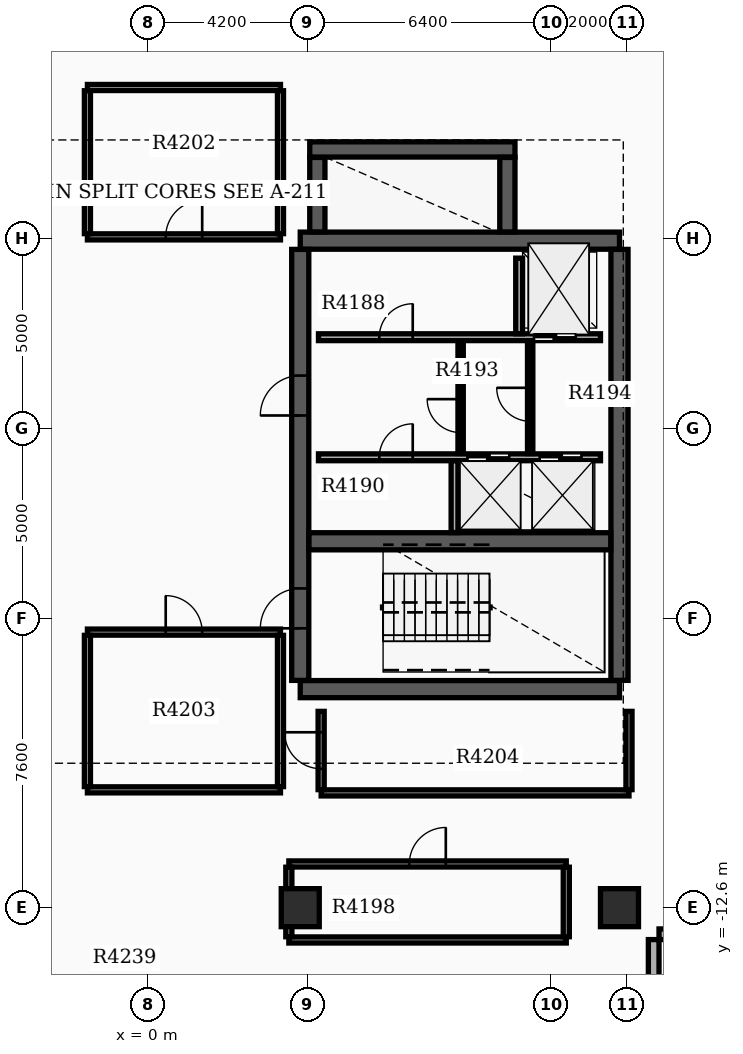
"""IFC4 building model, lengths in metres.
Left out: names, types, materials, properties, quantities, classifications, styles, units other than length and angle.
Written with IfcOpenShell. Run it as: python <this file> out.ifc"""

import sys

from ifc_helpers import new_model, si_unit, direction, frame, frame_2d, origin, origin_2d, place, context, subcontext, project, spatial, rectangle, extrude, element, fill, save


model = new_model("IFC4")
c1 = context("Model", 3, precision=1e-05, world=origin(), true_north=direction((0.0, 1.0)))
c2 = subcontext(c1, "Body", "Model", "MODEL_VIEW")
j1 = project(units=[si_unit("LENGTHUNIT", "METRE"), si_unit("PLANEANGLEUNIT", "RADIAN")], contexts=[c1])
p1 = place(None, origin())
s1 = spatial("IfcSite", under=j1, at=p1, CompositionType="ELEMENT")
p2 = place(p1, origin())
s2 = spatial("IfcBuilding", under=s1, at=p2, CompositionType="ELEMENT")
p3 = place(p2, frame((0.0, 0.0, 265.5)))
s3 = spatial("IfcBuildingStorey", under=s2, at=p3, CompositionType="ELEMENT", Elevation=265.5)
for number, where, z_axis, x_axis in (
    (1, (4.0, -6.85, 0.0), (0.0, 0.0, 1.0), (1.0, 0.0, 0.0)),
    (2, (4.0, 4.95, 0.0), (0.0, 0.0, 1.0), (1.0, 0.0, 0.0)),
):
    element("IfcWall", number, at=place(p3, frame(where, z_axis=z_axis, x_axis=x_axis)), inside=s3, PredefinedType="SHEAR", context=c2, shape_type="SweptSolid", body=[
        extrude(rectangle(XDim=8.4, YDim=0.45, at=frame_2d((4.2, 0.0))), origin(), (0.0, 0.0, 1.0), 3.7),
    ])
p4 = place(p3, frame((4.0, -6.62, 0.0), z_axis=(0.0, 0.0, 1.0), x_axis=(0.0, 1.0, 0.0)))
e3 = element("IfcWall", 3, at=p4, inside=s3, PredefinedType="SHEAR", context=c2, shape_type="SweptSolid", body=[
    extrude(rectangle(XDim=11.34, YDim=0.45, at=frame_2d((5.67, 0.0))), origin(), (0.0, 0.0, 1.0), 3.7),
])
p5 = place(p4, frame((1.37, 0.0, 0.0)))
e4 = element("IfcOpeningElement", 4, at=p5, cuts=e3, PredefinedType="OPENING", context=c2, shape_type="SweptSolid", body=[
    extrude(rectangle(XDim=1.05, YDim=2.15, at=frame_2d((0.525, 1.075))), frame((0.0, 0.235, 0.0), z_axis=(0.0, -1.0, 0.0), x_axis=(1.0, 0.0, 0.0)), (0.0, 0.0, 1.0), 0.47),
])
p6 = place(p4, frame((6.97, 0.0, 0.0)))
e5 = element("IfcOpeningElement", 5, at=p6, cuts=e3, PredefinedType="OPENING", context=c2, shape_type="SweptSolid", body=[
    extrude(rectangle(XDim=1.05, YDim=2.15, at=frame_2d((0.525, 1.075))), frame((0.0, 0.235, 0.0), z_axis=(0.0, -1.0, 0.0), x_axis=(1.0, 0.0, 0.0)), (0.0, 0.0, 1.0), 0.47),
])
p7 = place(p3, frame((12.4, -6.62, 0.0), z_axis=(0.0, 0.0, 1.0), x_axis=(0.0, 1.0, 0.0)))
e6 = element("IfcWall", 6, at=p7, inside=s3, PredefinedType="SHEAR", context=c2, shape_type="SweptSolid", body=[
    extrude(rectangle(XDim=11.34, YDim=0.45, at=frame_2d((5.67, 0.0))), origin(), (0.0, 0.0, 1.0), 3.7),
])
p8 = place(p3, frame((4.23, -2.96, 0.0), z_axis=(0.0, 0.0, 1.0), x_axis=(1.0, 0.0, 0.0)))
e7 = element("IfcWall", 7, at=p8, inside=s3, PredefinedType="SHEAR", context=c2, shape_type="SweptSolid", body=[
    extrude(rectangle(XDim=7.94, YDim=0.45, at=frame_2d((3.97, 0.0))), origin(), (0.0, 0.0, 1.0), 3.7),
])
p9 = place(p3, frame((4.45, 5.18, 0.0), z_axis=(0.0, 0.0, 1.0), x_axis=(0.0, 1.0, 0.0)))
e8 = element("IfcWall", 8, at=p9, inside=s3, PredefinedType="SHEAR", context=c2, shape_type="SweptSolid", body=[
    extrude(rectangle(XDim=1.96, YDim=0.4, at=frame_2d((0.98, 0.0))), origin(), (0.0, 0.0, 1.0), 3.7),
])
p10 = place(p3, frame((4.25, 7.35, 0.0), z_axis=(0.0, 0.0, 1.0), x_axis=(1.0, 0.0, 0.0)))
e9 = element("IfcWall", 9, at=p10, inside=s3, PredefinedType="SHEAR", context=c2, shape_type="SweptSolid", body=[
    extrude(rectangle(XDim=5.4, YDim=0.4, at=frame_2d((2.7, 0.0))), origin(), (0.0, 0.0, 1.0), 3.7),
])
p11 = place(p3, frame((9.45, 5.18, 0.0), z_axis=(0.0, 0.0, 1.0), x_axis=(0.0, 1.0, 0.0)))
e10 = element("IfcWall", 10, at=p11, inside=s3, PredefinedType="SHEAR", context=c2, shape_type="SweptSolid", body=[
    extrude(rectangle(XDim=1.96, YDim=0.4, at=frame_2d((0.98, 0.0))), origin(), (0.0, 0.0, 1.0), 3.7),
])
for number, where, z_axis, x_axis in (
    (11, (12.4, -12.6, 0.0), (0.0, 0.0, 1.0), (1.0, 0.0, 0.0)),
    (12, (4.0, -12.6, 0.0), (0.0, 0.0, 1.0), (1.0, 0.0, 0.0)),
):
    element("IfcColumn", number, at=place(p3, frame(where, z_axis=z_axis, x_axis=x_axis)), inside=s3, PredefinedType="COLUMN", context=c2, shape_type="SweptSolid", body=[
        extrude(rectangle(XDim=1.0, YDim=1.0, at=origin_2d()), origin(), (0.0, 0.0, 1.0), 3.9),
    ])
p12 = place(p3, frame((14.66, -13.3, 0.0), z_axis=(0.0, 0.0, 1.0), x_axis=(-1.0, 0.0, 0.0)))
e13 = element("IfcWall", 13, at=p12, inside=s3, PredefinedType="STANDARD", context=c2, shape_type="SweptSolid", body=[
    extrude(rectangle(XDim=1.22, YDim=0.28, at=frame_2d((0.61, 0.0))), origin(), (0.0, 0.0, 1.0), 3.18),
])
p13 = place(p3, frame((13.3, -13.44, 0.0), z_axis=(0.0, 0.0, 1.0), x_axis=(0.0, -1.0, 0.0)))
e14 = element("IfcWall", 14, at=p13, inside=s3, PredefinedType="STANDARD", context=c2, shape_type="SweptSolid", body=[
    extrude(rectangle(XDim=1.5, YDim=0.28, at=frame_2d((0.75, 0.0))), origin(), (0.0, 0.0, 1.0), 3.18),
])
p14 = place(p3, frame((4.48, 2.41, 0.0), z_axis=(0.0, 0.0, 1.0), x_axis=(1.0, 0.0, 0.0)))
e15 = element("IfcWall", 15, at=p14, inside=s3, PredefinedType="SOLIDWALL", context=c2, shape_type="SweptSolid", body=[
    extrude(rectangle(XDim=7.42, YDim=0.18, at=frame_2d((3.71, 0.0))), origin(), (0.0, 0.0, 1.0), 3.17),
])
p15 = place(p14, frame((5.67, 0.0, 0.0)))
e16 = element("IfcOpeningElement", 16, at=p15, cuts=e15, PredefinedType="OPENING", context=c2, shape_type="SweptSolid", body=[
    extrude(rectangle(XDim=1.1, YDim=2.15, at=frame_2d((0.55, 1.075))), frame((0.0, 0.1, 0.0), z_axis=(0.0, -1.0, 0.0), x_axis=(1.0, 0.0, 0.0)), (0.0, 0.0, 1.0), 0.2),
])
p16 = place(p14, frame((1.6, 0.0, 0.0)))
e17 = element("IfcOpeningElement", 17, at=p16, cuts=e15, PredefinedType="OPENING", context=c2, shape_type="SweptSolid", body=[
    extrude(rectangle(XDim=0.88, YDim=2.1, at=frame_2d((0.44, 1.05))), frame((0.0, 0.1, 0.0), z_axis=(0.0, -1.0, 0.0), x_axis=(1.0, 0.0, 0.0)), (0.0, 0.0, 1.0), 0.2),
])
p17 = place(p3, frame((4.48, -0.75, 0.0), z_axis=(0.0, 0.0, 1.0), x_axis=(1.0, 0.0, 0.0)))
e18 = element("IfcWall", 18, at=p17, inside=s3, PredefinedType="SOLIDWALL", context=c2, shape_type="SweptSolid", body=[
    extrude(rectangle(XDim=7.42, YDim=0.18, at=frame_2d((3.71, 0.0))), origin(), (0.0, 0.0, 1.0), 3.17),
])
p18 = place(p17, frame((3.92, 0.0, 0.0)))
e19 = element("IfcOpeningElement", 19, at=p18, cuts=e18, PredefinedType="OPENING", context=c2, shape_type="SweptSolid", body=[
    extrude(rectangle(XDim=1.1, YDim=2.15, at=frame_2d((0.55, 1.075))), frame((0.0, 0.1, 0.0), z_axis=(0.0, -1.0, 0.0), x_axis=(1.0, 0.0, 0.0)), (0.0, 0.0, 1.0), 0.2),
])
p19 = place(p17, frame((5.82, 0.0, 0.0)))
e20 = element("IfcOpeningElement", 20, at=p19, cuts=e18, PredefinedType="OPENING", context=c2, shape_type="SweptSolid", body=[
    extrude(rectangle(XDim=1.1, YDim=2.15, at=frame_2d((0.55, 1.075))), frame((0.0, 0.1, 0.0), z_axis=(0.0, -1.0, 0.0), x_axis=(1.0, 0.0, 0.0)), (0.0, 0.0, 1.0), 0.2),
])
p20 = place(p17, frame((1.6, 0.0, 0.0)))
e21 = element("IfcOpeningElement", 21, at=p20, cuts=e18, PredefinedType="OPENING", context=c2, shape_type="SweptSolid", body=[
    extrude(rectangle(XDim=0.88, YDim=2.1, at=frame_2d((0.44, 1.05))), frame((0.0, 0.1, 0.0), z_axis=(0.0, -1.0, 0.0), x_axis=(1.0, 0.0, 0.0)), (0.0, 0.0, 1.0), 0.2),
])
p21 = place(p3, frame((9.76, 2.5, 0.0), z_axis=(0.0, 0.0, 1.0), x_axis=(0.0, 1.0, 0.0)))
e22 = element("IfcWall", 22, at=p21, inside=s3, PredefinedType="SOLIDWALL", context=c2, shape_type="SweptSolid", body=[
    extrude(rectangle(XDim=1.99, YDim=0.18, at=frame_2d((0.995, 0.0))), origin(), (0.0, 0.0, 1.0), 3.17),
])
p22 = place(p3, frame((8.06, -2.73, 0.0), z_axis=(0.0, 0.0, 1.0), x_axis=(0.0, 1.0, 0.0)))
e23 = element("IfcWall", 23, at=p22, inside=s3, PredefinedType="SOLIDWALL", context=c2, shape_type="SweptSolid", body=[
    extrude(rectangle(XDim=1.89, YDim=0.18, at=frame_2d((0.945, 0.0))), origin(), (0.0, 0.0, 1.0), 3.17),
])
p23 = place(p3, frame((8.22, -0.65, 0.0), z_axis=(0.0, 0.0, 1.0), x_axis=(0.0, 1.0, 0.0)))
e24 = element("IfcWall", 24, at=p23, inside=s3, PredefinedType="SOLIDWALL", context=c2, shape_type="SweptSolid", body=[
    extrude(rectangle(XDim=2.96, YDim=0.14, at=frame_2d((1.48, 0.0))), origin(), (0.0, 0.0, 1.0), 3.17),
])
p24 = place(p23, frame((0.55, 0.0, 0.0)))
e25 = element("IfcOpeningElement", 25, at=p24, cuts=e24, PredefinedType="OPENING", context=c2, shape_type="SweptSolid", body=[
    extrude(rectangle(XDim=0.88, YDim=2.1, at=frame_2d((0.44, 1.05))), frame((0.0, 0.08, 0.0), z_axis=(0.0, -1.0, 0.0), x_axis=(1.0, 0.0, 0.0)), (0.0, 0.0, 1.0), 0.16),
])
p25 = place(p3, frame((10.05, -0.652, 0.0), z_axis=(0.0, 0.0, 1.0), x_axis=(0.0, 1.0, 0.0)))
e26 = element("IfcWall", 26, at=p25, inside=s3, PredefinedType="PARTITIONING", context=c2, shape_type="SweptSolid", body=[
    extrude(rectangle(XDim=2.962, YDim=0.14, at=frame_2d((1.481, 0.0))), origin(), (0.0, 0.0, 1.0), 3.17),
])
p26 = place(p25, frame((0.85, 0.0, 0.0)))
e27 = element("IfcOpeningElement", 27, at=p26, cuts=e26, PredefinedType="OPENING", context=c2, shape_type="SweptSolid", body=[
    extrude(rectangle(XDim=0.88, YDim=2.1, at=frame_2d((0.44, 1.05))), frame((0.0, 0.08, 0.0), z_axis=(0.0, -1.0, 0.0), x_axis=(1.0, 0.0, 0.0)), (0.0, 0.0, 1.0), 0.16),
])
p27 = place(p3, frame((3.7, -13.45, 0.0), z_axis=(0.0, 0.0, 1.0), x_axis=(1.0, 0.0, 0.0)))
e28 = element("IfcWall", 28, at=p27, inside=s3, PredefinedType="PARTITIONING", context=c2, shape_type="SweptSolid", body=[
    extrude(rectangle(XDim=7.3, YDim=0.16, at=frame_2d((3.65, 0.0))), origin(), (0.0, 0.0, 1.0), 3.17),
])
p28 = place(p3, frame((3.7, -11.45, 0.0), z_axis=(0.0, 0.0, 1.0), x_axis=(1.0, 0.0, 0.0)))
e29 = element("IfcWall", 29, at=p28, inside=s3, PredefinedType="PARTITIONING", context=c2, shape_type="SweptSolid", body=[
    extrude(rectangle(XDim=7.3, YDim=0.16, at=frame_2d((3.65, 0.0))), origin(), (0.0, 0.0, 1.0), 3.17),
])
p29 = place(p28, frame((3.17, 0.0, 0.0)))
e30 = element("IfcOpeningElement", 30, at=p29, cuts=e29, PredefinedType="OPENING", context=c2, shape_type="SweptSolid", body=[
    extrude(rectangle(XDim=0.96, YDim=2.15, at=frame_2d((0.48, 1.075))), frame((0.0, 0.09, 0.0), z_axis=(0.0, -1.0, 0.0), x_axis=(1.0, 0.0, 0.0)), (0.0, 0.0, 1.0), 0.18),
])
for number, where, z_axis, x_axis in (
    (31, (3.7, -13.365, 0.0), (0.0, 0.0, 1.0), (0.0, 1.0, 0.0)),
    (32, (11.0, -13.365, 0.0), (0.0, 0.0, 1.0), (0.0, 1.0, 0.0)),
):
    element("IfcWall", number, at=place(p3, frame(where, z_axis=z_axis, x_axis=x_axis)), inside=s3, PredefinedType="PARTITIONING", context=c2, shape_type="SweptSolid", body=[
        extrude(rectangle(XDim=1.83, YDim=0.16, at=frame_2d((0.915, 0.0))), origin(), (0.0, 0.0, 1.0), 3.17),
    ])
p30 = place(p3, frame((-1.6, 5.05, 0.0), z_axis=(0.0, 0.0, 1.0), x_axis=(1.0, 0.0, 0.0)))
e33 = element("IfcWall", 33, at=p30, inside=s3, PredefinedType="PARTITIONING", context=c2, shape_type="SweptSolid", body=[
    extrude(rectangle(XDim=5.08, YDim=0.16, at=frame_2d((2.54, 0.0))), origin(), (0.0, 0.0, 1.0), 3.17),
])
p31 = place(p30, frame((2.06, 0.0, 0.0)))
e34 = element("IfcOpeningElement", 34, at=p31, cuts=e33, PredefinedType="OPENING", context=c2, shape_type="SweptSolid", body=[
    extrude(rectangle(XDim=0.96, YDim=2.15, at=frame_2d((0.48, 1.075))), frame((0.0, 0.09, 0.0), z_axis=(0.0, -1.0, 0.0), x_axis=(1.0, 0.0, 0.0)), (0.0, 0.0, 1.0), 0.18),
])
p32 = place(p3, frame((-1.6, 8.98, 0.0), z_axis=(0.0, 0.0, 1.0), x_axis=(1.0, 0.0, 0.0)))
e35 = element("IfcWall", 35, at=p32, inside=s3, PredefinedType="PARTITIONING", context=c2, shape_type="SweptSolid", body=[
    extrude(rectangle(XDim=5.08, YDim=0.16, at=frame_2d((2.54, 0.0))), origin(), (0.0, 0.0, 1.0), 3.17),
])
for number, where, z_axis, x_axis in (
    (36, (-1.6, 5.135, 0.0), (0.0, 0.0, 1.0), (0.0, 1.0, 0.0)),
    (37, (3.48, 5.135, 0.0), (0.0, 0.0, 1.0), (0.0, 1.0, 0.0)),
):
    element("IfcWall", number, at=place(p3, frame(where, z_axis=z_axis, x_axis=x_axis)), inside=s3, PredefinedType="PARTITIONING", context=c2, shape_type="SweptSolid", body=[
        extrude(rectangle(XDim=3.76, YDim=0.16, at=frame_2d((1.88, 0.0))), origin(), (0.0, 0.0, 1.0), 3.17),
    ])
p33 = place(p3, frame((-1.6, -9.5, 0.0), z_axis=(0.0, 0.0, 1.0), x_axis=(1.0, 0.0, 0.0)))
e38 = element("IfcWall", 38, at=p33, inside=s3, PredefinedType="PARTITIONING", context=c2, shape_type="SweptSolid", body=[
    extrude(rectangle(XDim=5.08, YDim=0.16, at=frame_2d((2.54, 0.0))), origin(), (0.0, 0.0, 1.0), 3.17),
])
p34 = place(p3, frame((-1.6, -5.35, 0.0), z_axis=(0.0, 0.0, 1.0), x_axis=(1.0, 0.0, 0.0)))
e39 = element("IfcWall", 39, at=p34, inside=s3, PredefinedType="PARTITIONING", context=c2, shape_type="SweptSolid", body=[
    extrude(rectangle(XDim=5.08, YDim=0.16, at=frame_2d((2.54, 0.0))), origin(), (0.0, 0.0, 1.0), 3.17),
])
p35 = place(p34, frame((2.06, 0.0, 0.0)))
e40 = element("IfcOpeningElement", 40, at=p35, cuts=e39, PredefinedType="OPENING", context=c2, shape_type="SweptSolid", body=[
    extrude(rectangle(XDim=0.96, YDim=2.15, at=frame_2d((0.48, 1.075))), frame((0.0, 0.09, 0.0), z_axis=(0.0, -1.0, 0.0), x_axis=(1.0, 0.0, 0.0)), (0.0, 0.0, 1.0), 0.18),
])
for number, where, z_axis, x_axis in (
    (41, (-1.6, -9.415, 0.0), (0.0, 0.0, 1.0), (0.0, 1.0, 0.0)),
    (42, (3.48, -9.415, 0.0), (0.0, 0.0, 1.0), (0.0, 1.0, 0.0)),
):
    element("IfcWall", number, at=place(p3, frame(where, z_axis=z_axis, x_axis=x_axis)), inside=s3, PredefinedType="PARTITIONING", context=c2, shape_type="SweptSolid", body=[
        extrude(rectangle(XDim=3.98, YDim=0.16, at=frame_2d((1.99, 0.0))), origin(), (0.0, 0.0, 1.0), 3.17),
    ])
p36 = place(p3, frame((4.55, -9.58, 0.0), z_axis=(0.0, 0.0, 1.0), x_axis=(1.0, 0.0, 0.0)))
e43 = element("IfcWall", 43, at=p36, inside=s3, PredefinedType="PARTITIONING", context=c2, shape_type="SweptSolid", body=[
    extrude(rectangle(XDim=8.1, YDim=0.16, at=frame_2d((4.05, 0.0))), origin(), (0.0, 0.0, 1.0), 3.17),
])
p37 = place(p3, frame((4.55, -9.495, 0.0), z_axis=(0.0, 0.0, 1.0), x_axis=(0.0, 1.0, 0.0)))
e44 = element("IfcWall", 44, at=p37, inside=s3, PredefinedType="PARTITIONING", context=c2, shape_type="SweptSolid", body=[
    extrude(rectangle(XDim=2.06, YDim=0.16, at=frame_2d((1.03, 0.0))), origin(), (0.0, 0.0, 1.0), 3.17),
])
p38 = place(p37, frame((0.55, 0.0, 0.0)))
e45 = element("IfcOpeningElement", 45, at=p38, cuts=e44, PredefinedType="OPENING", context=c2, shape_type="SweptSolid", body=[
    extrude(rectangle(XDim=0.96, YDim=2.15, at=frame_2d((0.48, 1.075))), frame((0.0, 0.09, 0.0), z_axis=(0.0, -1.0, 0.0), x_axis=(1.0, 0.0, 0.0)), (0.0, 0.0, 1.0), 0.18),
])
p39 = place(p3, frame((12.65, -9.495, 0.0), z_axis=(0.0, 0.0, 1.0), x_axis=(0.0, 1.0, 0.0)))
e46 = element("IfcWall", 46, at=p39, inside=s3, PredefinedType="PARTITIONING", context=c2, shape_type="SweptSolid", body=[
    extrude(rectangle(XDim=2.06, YDim=0.16, at=frame_2d((1.03, 0.0))), origin(), (0.0, 0.0, 1.0), 3.17),
])
p40 = place(p5, origin())
e47 = element("IfcDoor", 47, at=p40, inside=s3, OperationType="SINGLE_SWING_LEFT", PredefinedType="DOOR", context=c2, shape_type="SweptSolid", body=[
    extrude(rectangle(XDim=1.05, YDim=2.15, at=frame_2d((0.525, 1.075))), frame((0.0, 0.025, 0.0), z_axis=(0.0, -1.0, 0.0), x_axis=(1.0, 0.0, 0.0)), (0.0, 0.0, 1.0), 0.05),
])
fill(e4, e47)
p41 = place(p6, origin())
e48 = element("IfcDoor", 48, at=p41, inside=s3, OperationType="SINGLE_SWING_LEFT", PredefinedType="DOOR", context=c2, shape_type="SweptSolid", body=[
    extrude(rectangle(XDim=1.05, YDim=2.15, at=frame_2d((0.525, 1.075))), frame((0.0, 0.025, 0.0), z_axis=(0.0, -1.0, 0.0), x_axis=(1.0, 0.0, 0.0)), (0.0, 0.0, 1.0), 0.05),
])
fill(e5, e48)
p42 = place(p15, origin())
e49 = element("IfcDoor", 49, at=p42, inside=s3, OperationType="DOUBLE_DOOR_SLIDING", PredefinedType="DOOR", context=c2, shape_type="SweptSolid", body=[
    extrude(rectangle(XDim=1.1, YDim=2.15, at=frame_2d((0.55, 1.075))), frame((0.0, 0.025, 0.0), z_axis=(0.0, -1.0, 0.0), x_axis=(1.0, 0.0, 0.0)), (0.0, 0.0, 1.0), 0.05),
])
fill(e16, e49)
p43 = place(p18, origin())
e50 = element("IfcDoor", 50, at=p43, inside=s3, OperationType="DOUBLE_DOOR_SLIDING", PredefinedType="DOOR", context=c2, shape_type="SweptSolid", body=[
    extrude(rectangle(XDim=1.1, YDim=2.15, at=frame_2d((0.55, 1.075))), frame((0.0, 0.025, 0.0), z_axis=(0.0, -1.0, 0.0), x_axis=(1.0, 0.0, 0.0)), (0.0, 0.0, 1.0), 0.05),
])
fill(e19, e50)
p44 = place(p19, origin())
e51 = element("IfcDoor", 51, at=p44, inside=s3, OperationType="DOUBLE_DOOR_SLIDING", PredefinedType="DOOR", context=c2, shape_type="SweptSolid", body=[
    extrude(rectangle(XDim=1.1, YDim=2.15, at=frame_2d((0.55, 1.075))), frame((0.0, 0.025, 0.0), z_axis=(0.0, -1.0, 0.0), x_axis=(1.0, 0.0, 0.0)), (0.0, 0.0, 1.0), 0.05),
])
fill(e20, e51)
p45 = place(p16, origin())
e52 = element("IfcDoor", 52, at=p45, inside=s3, OperationType="SINGLE_SWING_RIGHT", PredefinedType="DOOR", context=c2, shape_type="SweptSolid", body=[
    extrude(rectangle(XDim=0.88, YDim=2.1, at=frame_2d((0.44, 1.05))), frame((0.0, 0.025, 0.0), z_axis=(0.0, -1.0, 0.0), x_axis=(1.0, 0.0, 0.0)), (0.0, 0.0, 1.0), 0.05),
])
fill(e17, e52)
p46 = place(p20, origin())
e53 = element("IfcDoor", 53, at=p46, inside=s3, OperationType="SINGLE_SWING_RIGHT", PredefinedType="DOOR", context=c2, shape_type="SweptSolid", body=[
    extrude(rectangle(XDim=0.88, YDim=2.1, at=frame_2d((0.44, 1.05))), frame((0.0, 0.025, 0.0), z_axis=(0.0, -1.0, 0.0), x_axis=(1.0, 0.0, 0.0)), (0.0, 0.0, 1.0), 0.05),
])
fill(e21, e53)
p47 = place(p24, origin())
e54 = element("IfcDoor", 54, at=p47, inside=s3, OperationType="SINGLE_SWING_RIGHT", PredefinedType="DOOR", context=c2, shape_type="SweptSolid", body=[
    extrude(rectangle(XDim=0.88, YDim=2.1, at=frame_2d((0.44, 1.05))), frame((0.0, 0.025, 0.0), z_axis=(0.0, -1.0, 0.0), x_axis=(1.0, 0.0, 0.0)), (0.0, 0.0, 1.0), 0.05),
])
fill(e25, e54)
p48 = place(p26, origin())
e55 = element("IfcDoor", 55, at=p48, inside=s3, OperationType="SINGLE_SWING_RIGHT", PredefinedType="DOOR", context=c2, shape_type="SweptSolid", body=[
    extrude(rectangle(XDim=0.88, YDim=2.1, at=frame_2d((0.44, 1.05))), frame((0.0, 0.025, 0.0), z_axis=(0.0, -1.0, 0.0), x_axis=(1.0, 0.0, 0.0)), (0.0, 0.0, 1.0), 0.05),
])
fill(e27, e55)
p49 = place(p29, origin())
e56 = element("IfcDoor", 56, at=p49, inside=s3, OperationType="SINGLE_SWING_RIGHT", PredefinedType="DOOR", context=c2, shape_type="SweptSolid", body=[
    extrude(rectangle(XDim=0.96, YDim=2.15, at=frame_2d((0.48, 1.075))), frame((0.0, 0.025, 0.0), z_axis=(0.0, -1.0, 0.0), x_axis=(1.0, 0.0, 0.0)), (0.0, 0.0, 1.0), 0.05),
])
fill(e30, e56)
p50 = place(p31, origin())
e57 = element("IfcDoor", 57, at=p50, inside=s3, OperationType="SINGLE_SWING_RIGHT", PredefinedType="DOOR", context=c2, shape_type="SweptSolid", body=[
    extrude(rectangle(XDim=0.96, YDim=2.15, at=frame_2d((0.48, 1.075))), frame((0.0, 0.025, 0.0), z_axis=(0.0, -1.0, 0.0), x_axis=(1.0, 0.0, 0.0)), (0.0, 0.0, 1.0), 0.05),
])
fill(e34, e57)
p51 = place(p35, origin())
e58 = element("IfcDoor", 58, at=p51, inside=s3, OperationType="SINGLE_SWING_LEFT", PredefinedType="DOOR", context=c2, shape_type="SweptSolid", body=[
    extrude(rectangle(XDim=0.96, YDim=2.15, at=frame_2d((0.48, 1.075))), frame((0.0, 0.025, 0.0), z_axis=(0.0, -1.0, 0.0), x_axis=(1.0, 0.0, 0.0)), (0.0, 0.0, 1.0), 0.05),
])
fill(e40, e58)
p52 = place(p38, origin())
e59 = element("IfcDoor", 59, at=p52, inside=s3, OperationType="SINGLE_SWING_RIGHT", PredefinedType="DOOR", context=c2, shape_type="SweptSolid", body=[
    extrude(rectangle(XDim=0.96, YDim=2.15, at=frame_2d((0.48, 1.075))), frame((0.0, 0.025, 0.0), z_axis=(0.0, -1.0, 0.0), x_axis=(1.0, 0.0, 0.0)), (0.0, 0.0, 1.0), 0.05),
])
fill(e45, e59)
save(model, sys.argv[1])
